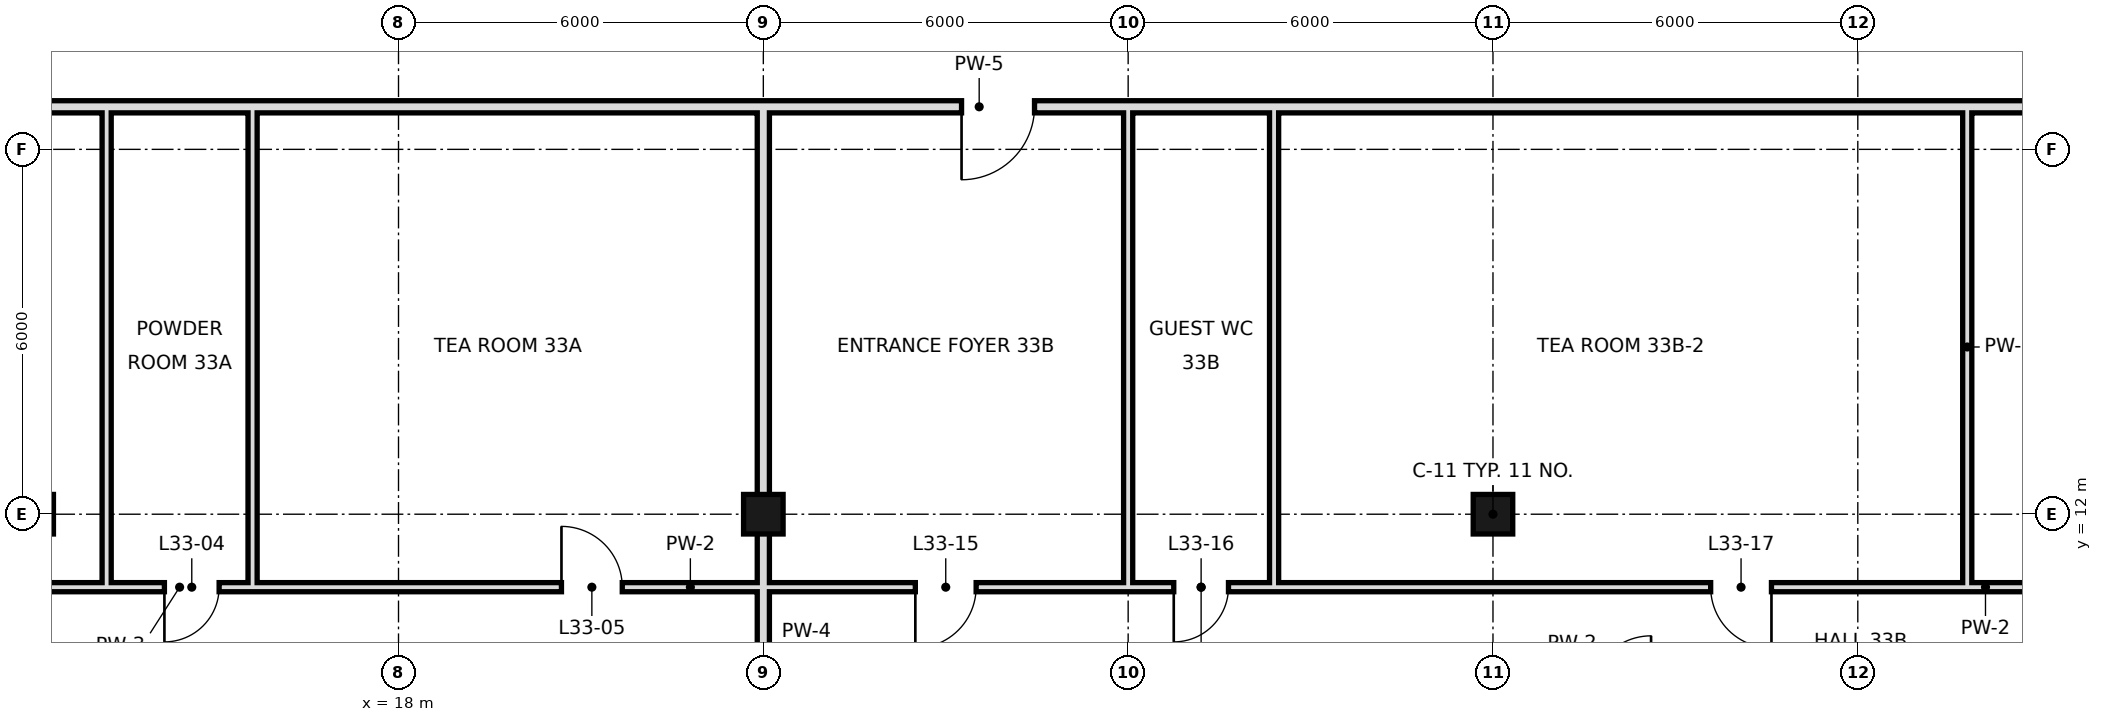
"""IFC4 building model, lengths in metres.
Left out: names, types, materials, properties, quantities, classifications, styles, units other than length and angle.
Written with IfcOpenShell. Run it as: python <this file> out.ifc"""

import sys

from ifc_helpers import new_model, si_unit, direction, frame, frame_2d, origin, origin_2d, place, context, subcontext, project, spatial, rectangle, hollow_rectangle, extrude, element, fill, save


model = new_model("IFC4")
c1 = context("Model", 3, precision=1e-05, world=origin(), true_north=direction((0.0, 1.0)))
c2 = subcontext(c1, "Body", "Model", "MODEL_VIEW")
j1 = project(units=[si_unit("LENGTHUNIT", "METRE"), si_unit("PLANEANGLEUNIT", "RADIAN")], contexts=[c1])
p1 = place(None, origin())
s1 = spatial("IfcSite", under=j1, at=p1, CompositionType="ELEMENT")
p2 = place(p1, origin())
s2 = spatial("IfcBuilding", under=s1, at=p2, CompositionType="ELEMENT")
p3 = place(p2, frame((0.0, 0.0, 147.4)))
s3 = spatial("IfcBuildingStorey", under=s2, at=p3, CompositionType="ELEMENT", Elevation=147.4)
for number, where, z_axis, x_axis in (
    (1, (12.0, 12.0, 0.0), (0.0, 0.0, 1.0), (1.0, 0.0, 0.0)),
    (2, (24.0, 12.0, 0.0), (0.0, 0.0, 1.0), (1.0, 0.0, 0.0)),
    (3, (36.0, 12.0, 0.0), (0.0, 0.0, 1.0), (1.0, 0.0, 0.0)),
):
    element("IfcColumn", number, at=place(p3, frame(where, z_axis=z_axis, x_axis=x_axis)), inside=s3, PredefinedType="COLUMN", context=c2, shape_type="SweptSolid", body=[
        extrude(hollow_rectangle(XDim=0.65, YDim=0.65, WallThickness=0.032, at=origin_2d()), origin(), (0.0, 0.0, 1.0), 3.6),
    ])
for number, where, z_axis, x_axis in (
    (4, (13.2, 10.8, 0.0), (0.0, 0.0, 1.0), (0.0, 1.0, 0.0)),
    (5, (15.6, 10.8, 0.0), (0.0, 0.0, 1.0), (0.0, 1.0, 0.0)),
):
    element("IfcWall", number, at=place(p3, frame(where, z_axis=z_axis, x_axis=x_axis)), inside=s3, PredefinedType="PARTITIONING", context=c2, shape_type="SweptSolid", body=[
        extrude(rectangle(XDim=7.9, YDim=0.15, at=frame_2d((3.95, 0.0))), origin(), (0.0, 0.0, 1.0), 3.42),
    ])
p4 = place(p3, frame((24.0, 0.0, 0.0), z_axis=(0.0, 0.0, 1.0), x_axis=(0.0, 1.0, 0.0)))
e6 = element("IfcWall", 6, at=p4, inside=s3, PredefinedType="SOLIDWALL", context=c2, shape_type="SweptSolid", body=[
    extrude(rectangle(XDim=18.7, YDim=0.2, at=frame_2d((9.35, 0.0))), origin(), (0.0, 0.0, 1.0), 2.72),
])
p5 = place(p3, frame((30.0, 10.8, 0.0), z_axis=(0.0, 0.0, 1.0), x_axis=(0.0, 1.0, 0.0)))
e7 = element("IfcWall", 7, at=p5, inside=s3, PredefinedType="PARTITIONING", context=c2, shape_type="SweptSolid", body=[
    extrude(rectangle(XDim=7.9, YDim=0.15, at=frame_2d((3.95, 0.0))), origin(), (0.0, 0.0, 1.0), 2.72),
])
for number, where, z_axis, x_axis in (
    (8, (32.4, 10.8, 0.0), (0.0, 0.0, 1.0), (0.0, 1.0, 0.0)),
    (9, (43.8, 10.8, 0.0), (0.0, 0.0, 1.0), (0.0, 1.0, 0.0)),
):
    element("IfcWall", number, at=place(p3, frame(where, z_axis=z_axis, x_axis=x_axis)), inside=s3, PredefinedType="PARTITIONING", context=c2, shape_type="SweptSolid", body=[
        extrude(rectangle(XDim=7.9, YDim=0.15, at=frame_2d((3.95, 0.0))), origin(), (0.0, 0.0, 1.0), 3.42),
    ])
p6 = place(p3, frame((-1.8, 10.8, 0.0), z_axis=(0.0, 0.0, 1.0), x_axis=(1.0, 0.0, 0.0)))
e10 = element("IfcWall", 10, at=p6, inside=s3, PredefinedType="PARTITIONING", context=c2, shape_type="SweptSolid", body=[
    extrude(rectangle(XDim=15.0, YDim=0.15, at=frame_2d((7.5, 0.0))), origin(), (0.0, 0.0, 1.0), 3.42),
])
p7 = place(p6, frame((11.5, 0.0, 0.0)))
e11 = element("IfcOpeningElement", 11, at=p7, cuts=e10, PredefinedType="OPENING", context=c2, shape_type="SweptSolid", body=[
    extrude(rectangle(XDim=1.0, YDim=2.4, at=frame_2d((0.5, 1.2))), frame((0.0, 0.085, 0.0), z_axis=(0.0, -1.0, 0.0), x_axis=(1.0, 0.0, 0.0)), (0.0, 0.0, 1.0), 0.17),
])
p8 = place(p6, frame((5.5, 0.0, 0.0)))
e12 = element("IfcOpeningElement", 12, at=p8, cuts=e10, PredefinedType="OPENING", context=c2, shape_type="SweptSolid", body=[
    extrude(rectangle(XDim=1.0, YDim=2.4, at=frame_2d((0.5, 1.2))), frame((0.0, 0.085, 0.0), z_axis=(0.0, -1.0, 0.0), x_axis=(1.0, 0.0, 0.0)), (0.0, 0.0, 1.0), 0.17),
])
p9 = place(p3, frame((15.6, 10.8, 0.0), z_axis=(0.0, 0.0, 1.0), x_axis=(1.0, 0.0, 0.0)))
e13 = element("IfcWall", 13, at=p9, inside=s3, PredefinedType="PARTITIONING", context=c2, shape_type="SweptSolid", body=[
    extrude(rectangle(XDim=14.4, YDim=0.15, at=frame_2d((7.2, 0.0))), origin(), (0.0, 0.0, 1.0), 3.42),
])
p10 = place(p9, frame((5.08, 0.0, 0.0)))
e14 = element("IfcOpeningElement", 14, at=p10, cuts=e13, PredefinedType="OPENING", context=c2, shape_type="SweptSolid", body=[
    extrude(rectangle(XDim=1.0, YDim=2.4, at=frame_2d((0.5, 1.2))), frame((0.0, 0.085, 0.0), z_axis=(0.0, -1.0, 0.0), x_axis=(1.0, 0.0, 0.0)), (0.0, 0.0, 1.0), 0.17),
])
p11 = place(p9, frame((10.9, 0.0, 0.0)))
e15 = element("IfcOpeningElement", 15, at=p11, cuts=e13, PredefinedType="OPENING", context=c2, shape_type="SweptSolid", body=[
    extrude(rectangle(XDim=1.0, YDim=2.4, at=frame_2d((0.5, 1.2))), frame((0.0, 0.085, 0.0), z_axis=(0.0, -1.0, 0.0), x_axis=(1.0, 0.0, 0.0)), (0.0, 0.0, 1.0), 0.17),
])
p12 = place(p3, frame((32.4, 10.8, 0.0), z_axis=(0.0, 0.0, 1.0), x_axis=(1.0, 0.0, 0.0)))
e16 = element("IfcWall", 16, at=p12, inside=s3, PredefinedType="PARTITIONING", context=c2, shape_type="SweptSolid", body=[
    extrude(rectangle(XDim=23.4, YDim=0.15, at=frame_2d((11.7, 0.0))), origin(), (0.0, 0.0, 1.0), 3.42),
])
p13 = place(p12, frame((7.18, 0.0, 0.0)))
e17 = element("IfcOpeningElement", 17, at=p13, cuts=e16, PredefinedType="OPENING", context=c2, shape_type="SweptSolid", body=[
    extrude(rectangle(XDim=1.0, YDim=2.4, at=frame_2d((0.5, 1.2))), frame((0.0, 0.085, 0.0), z_axis=(0.0, -1.0, 0.0), x_axis=(1.0, 0.0, 0.0)), (0.0, 0.0, 1.0), 0.17),
])
p14 = place(p12, frame((16.9, 0.0, 0.0)))
e18 = element("IfcOpeningElement", 18, at=p14, cuts=e16, PredefinedType="OPENING", context=c2, shape_type="SweptSolid", body=[
    extrude(rectangle(XDim=1.0, YDim=2.4, at=frame_2d((0.5, 1.2))), frame((0.0, 0.085, 0.0), z_axis=(0.0, -1.0, 0.0), x_axis=(1.0, 0.0, 0.0)), (0.0, 0.0, 1.0), 0.17),
])
p15 = place(p3, frame((13.2, 10.8, 0.0), z_axis=(0.0, 0.0, 1.0), x_axis=(1.0, 0.0, 0.0)))
e19 = element("IfcWall", 19, at=p15, inside=s3, PredefinedType="PARTITIONING", context=c2, shape_type="SweptSolid", body=[
    extrude(rectangle(XDim=2.4, YDim=0.15, at=frame_2d((1.2, 0.0))), origin(), (0.0, 0.0, 1.0), 3.42),
])
p16 = place(p15, frame((0.95, 0.0, 0.0)))
e20 = element("IfcOpeningElement", 20, at=p16, cuts=e19, PredefinedType="OPENING", context=c2, shape_type="SweptSolid", body=[
    extrude(rectangle(XDim=0.9, YDim=2.4, at=frame_2d((0.45, 1.2))), frame((0.0, 0.085, 0.0), z_axis=(0.0, -1.0, 0.0), x_axis=(1.0, 0.0, 0.0)), (0.0, 0.0, 1.0), 0.17),
])
p17 = place(p3, frame((30.0, 10.8, 0.0), z_axis=(0.0, 0.0, 1.0), x_axis=(1.0, 0.0, 0.0)))
e21 = element("IfcWall", 21, at=p17, inside=s3, PredefinedType="PARTITIONING", context=c2, shape_type="SweptSolid", body=[
    extrude(rectangle(XDim=2.4, YDim=0.15, at=frame_2d((1.2, 0.0))), origin(), (0.0, 0.0, 1.0), 3.42),
])
p18 = place(p17, frame((0.75, 0.0, 0.0)))
e22 = element("IfcOpeningElement", 22, at=p18, cuts=e21, PredefinedType="OPENING", context=c2, shape_type="SweptSolid", body=[
    extrude(rectangle(XDim=0.9, YDim=2.4, at=frame_2d((0.45, 1.2))), frame((0.0, 0.085, 0.0), z_axis=(0.0, -1.0, 0.0), x_axis=(1.0, 0.0, 0.0)), (0.0, 0.0, 1.0), 0.17),
])
p19 = place(p3, frame((3.1, 18.7, 0.0), z_axis=(0.0, 0.0, 1.0), x_axis=(1.0, 0.0, 0.0)))
e23 = element("IfcWall", 23, at=p19, inside=s3, PredefinedType="SOLIDWALL", context=c2, shape_type="SweptSolid", body=[
    extrude(rectangle(XDim=41.8, YDim=0.2, at=frame_2d((20.9, 0.0))), origin(), (0.0, 0.0, 1.0), 2.72),
])
p20 = place(p19, frame((5.64, 0.0, 0.0)))
e24 = element("IfcOpeningElement", 24, at=p20, cuts=e23, PredefinedType="OPENING", context=c2, shape_type="SweptSolid", body=[
    extrude(rectangle(XDim=1.2, YDim=2.4, at=frame_2d((0.6, 1.2))), frame((0.0, 0.11, 0.0), z_axis=(0.0, -1.0, 0.0), x_axis=(1.0, 0.0, 0.0)), (0.0, 0.0, 1.0), 0.22),
])
p21 = place(p19, frame((24.16, 0.0, 0.0)))
e25 = element("IfcOpeningElement", 25, at=p21, cuts=e23, PredefinedType="OPENING", context=c2, shape_type="SweptSolid", body=[
    extrude(rectangle(XDim=1.2, YDim=2.4, at=frame_2d((0.6, 1.2))), frame((0.0, 0.11, 0.0), z_axis=(0.0, -1.0, 0.0), x_axis=(1.0, 0.0, 0.0)), (0.0, 0.0, 1.0), 0.22),
])
p22 = place(p16, frame((0.9, 0.0, 0.0), z_axis=(0.0, 0.0, 1.0), x_axis=(-1.0, 0.0, 0.0)))
e26 = element("IfcDoor", 26, at=p22, inside=s3, OperationType="SINGLE_SWING_RIGHT", PredefinedType="DOOR", context=c2, shape_type="SweptSolid", body=[
    extrude(rectangle(XDim=0.9, YDim=2.4, at=frame_2d((0.45, 1.2))), frame((0.0, 0.025, 0.0), z_axis=(0.0, -1.0, 0.0), x_axis=(1.0, 0.0, 0.0)), (0.0, 0.0, 1.0), 0.05),
])
fill(e20, e26)
p23 = place(p10, origin())
e27 = element("IfcDoor", 27, at=p23, inside=s3, OperationType="SINGLE_SWING_LEFT", PredefinedType="DOOR", context=c2, shape_type="SweptSolid", body=[
    extrude(rectangle(XDim=1.0, YDim=2.4, at=frame_2d((0.5, 1.2))), frame((0.0, 0.025, 0.0), z_axis=(0.0, -1.0, 0.0), x_axis=(1.0, 0.0, 0.0)), (0.0, 0.0, 1.0), 0.05),
])
fill(e14, e27)
p24 = place(p11, frame((1.0, 0.0, 0.0), z_axis=(0.0, 0.0, 1.0), x_axis=(-1.0, 0.0, 0.0)))
e28 = element("IfcDoor", 28, at=p24, inside=s3, OperationType="SINGLE_SWING_RIGHT", PredefinedType="DOOR", context=c2, shape_type="SweptSolid", body=[
    extrude(rectangle(XDim=1.0, YDim=2.4, at=frame_2d((0.5, 1.2))), frame((0.0, 0.025, 0.0), z_axis=(0.0, -1.0, 0.0), x_axis=(1.0, 0.0, 0.0)), (0.0, 0.0, 1.0), 0.05),
])
fill(e15, e28)
p25 = place(p18, frame((0.9, 0.0, 0.0), z_axis=(0.0, 0.0, 1.0), x_axis=(-1.0, 0.0, 0.0)))
e29 = element("IfcDoor", 29, at=p25, inside=s3, OperationType="SINGLE_SWING_RIGHT", PredefinedType="DOOR", context=c2, shape_type="SweptSolid", body=[
    extrude(rectangle(XDim=0.9, YDim=2.4, at=frame_2d((0.45, 1.2))), frame((0.0, 0.025, 0.0), z_axis=(0.0, -1.0, 0.0), x_axis=(1.0, 0.0, 0.0)), (0.0, 0.0, 1.0), 0.05),
])
fill(e22, e29)
p26 = place(p13, origin())
e30 = element("IfcDoor", 30, at=p26, inside=s3, OperationType="SINGLE_SWING_RIGHT", PredefinedType="DOOR", context=c2, shape_type="SweptSolid", body=[
    extrude(rectangle(XDim=1.0, YDim=2.4, at=frame_2d((0.5, 1.2))), frame((0.0, 0.025, 0.0), z_axis=(0.0, -1.0, 0.0), x_axis=(1.0, 0.0, 0.0)), (0.0, 0.0, 1.0), 0.05),
])
fill(e17, e30)
p27 = place(p21, frame((1.2, 0.0, 0.0), z_axis=(0.0, 0.0, 1.0), x_axis=(-1.0, 0.0, 0.0)))
e31 = element("IfcDoor", 31, at=p27, inside=s3, OperationType="SINGLE_SWING_RIGHT", PredefinedType="DOOR", context=c2, shape_type="SweptSolid", body=[
    extrude(rectangle(XDim=1.2, YDim=2.4, at=frame_2d((0.6, 1.2))), frame((0.0, 0.025, 0.0), z_axis=(0.0, -1.0, 0.0), x_axis=(1.0, 0.0, 0.0)), (0.0, 0.0, 1.0), 0.05),
])
fill(e25, e31)
save(model, sys.argv[1])
